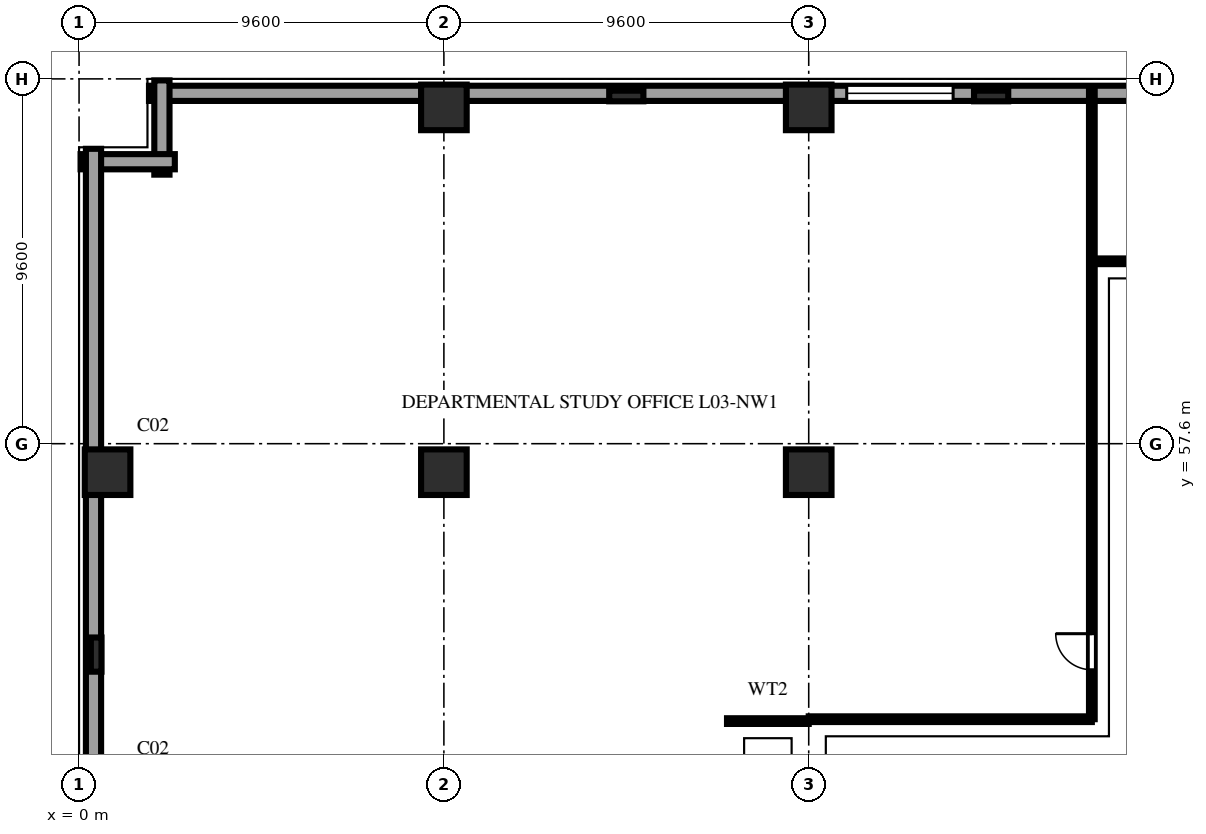
"""IFC4 building model, lengths in metres.
Left out: names, types, materials, properties, quantities, classifications, styles, units other than length and angle.
Written with IfcOpenShell. Run it as: python <this file> out.ifc"""

import sys

from ifc_helpers import new_model, si_unit, direction, frame, frame_2d, origin, origin_2d, place, context, subcontext, project, spatial, rectangle, extrude, element, fill, save


model = new_model("IFC4")
c1 = context("Model", 3, precision=1e-05, world=origin(), true_north=direction((0.0, 1.0)))
c2 = subcontext(c1, "Body", "Model", "MODEL_VIEW")
j1 = project(units=[si_unit("LENGTHUNIT", "METRE"), si_unit("PLANEANGLEUNIT", "RADIAN")], contexts=[c1])
p1 = place(None, origin())
s1 = spatial("IfcSite", under=j1, at=p1, CompositionType="ELEMENT")
p2 = place(p1, origin())
s2 = spatial("IfcBuilding", under=s1, at=p2, CompositionType="ELEMENT")
p3 = place(p2, frame((0.0, 0.0, 15.0)))
s3 = spatial("IfcBuildingStorey", under=s2, at=p3, CompositionType="ELEMENT", Elevation=15.0)
for number, where, z_axis, x_axis in (
    (1, (0.75, 56.85, 0.0), (0.0, 0.0, 1.0), (1.0, 0.0, 0.0)),
    (2, (9.6, 56.85, 0.0), (0.0, 0.0, 1.0), (1.0, 0.0, 0.0)),
    (3, (9.6, 66.45, 0.0), (0.0, 0.0, 1.0), (1.0, 0.0, 0.0)),
    (4, (19.2, 56.85, 0.0), (0.0, 0.0, 1.0), (1.0, 0.0, 0.0)),
    (5, (19.2, 66.45, 0.0), (0.0, 0.0, 1.0), (1.0, 0.0, 0.0)),
):
    element("IfcColumn", number, at=place(p3, frame(where, z_axis=z_axis, x_axis=x_axis)), inside=s3, PredefinedType="COLUMN", context=c2, shape_type="SweptSolid", body=[
        extrude(rectangle(XDim=1.2, YDim=1.2, at=origin_2d()), origin(), (0.0, 0.0, 1.0), 4.6),
    ])
for number, where, z_axis, x_axis in (
    (6, (0.45, 52.05, 0.0), (0.0, 0.0, 1.0), (0.0, 1.0, 0.0)),
    (7, (14.4, 66.75, 0.0), (0.0, 0.0, 1.0), (1.0, 0.0, 0.0)),
    (8, (24.0, 66.75, 0.0), (0.0, 0.0, 1.0), (1.0, 0.0, 0.0)),
):
    element("IfcColumn", number, at=place(p3, frame(where, z_axis=z_axis, x_axis=x_axis)), inside=s3, PredefinedType="PILASTER", context=c2, shape_type="SweptSolid", body=[
        extrude(rectangle(XDim=0.9, YDim=0.28, at=origin_2d()), origin(), (0.0, 0.0, 1.0), 4.6),
    ])
p4 = place(p3, frame((36.56, 66.82, 0.0), z_axis=(0.0, 0.0, 1.0), x_axis=(-1.0, 0.0, 0.0)))
e9 = element("IfcWall", 9, at=p4, inside=s3, PredefinedType="SOLIDWALL", context=c2, shape_type="SweptSolid", body=[
    extrude(rectangle(XDim=34.72, YDim=0.4, at=frame_2d((17.36, 0.0))), origin(), (0.0, 0.0, 1.0), 4.26),
])
p5 = place(p4, frame((13.56, 0.0, 0.75)))
e10 = element("IfcOpeningElement", 10, at=p5, cuts=e9, PredefinedType="OPENING", context=c2, shape_type="SweptSolid", body=[
    extrude(rectangle(XDim=2.8, YDim=2.3, at=frame_2d((1.4, 1.15))), frame((0.0, 0.212, 0.0), z_axis=(0.0, -1.0, 0.0), x_axis=(1.0, 0.0, 0.0)), (0.0, 0.0, 1.0), 0.424),
])
for number, where, z_axis, x_axis in (
    (11, (2.18, 67.16, 0.0), (0.0, 0.0, 1.0), (0.0, -1.0, 0.0)),
    (12, (2.52, 65.02, 0.0), (0.0, 0.0, 1.0), (-1.0, 0.0, 0.0)),
):
    element("IfcWall", number, at=place(p3, frame(where, z_axis=z_axis, x_axis=x_axis)), inside=s3, PredefinedType="SOLIDWALL", context=c2, shape_type="SweptSolid", body=[
        extrude(rectangle(XDim=2.48, YDim=0.4, at=frame_2d((1.24, 0.0))), origin(), (0.0, 0.0, 1.0), 4.26),
    ])
p6 = place(p3, frame((0.38, 65.36, 0.0), z_axis=(0.0, 0.0, 1.0), x_axis=(0.0, -1.0, 0.0)))
e13 = element("IfcWall", 13, at=p6, inside=s3, PredefinedType="SOLIDWALL", context=c2, shape_type="SweptSolid", body=[
    extrude(rectangle(XDim=63.52, YDim=0.4, at=frame_2d((31.76, 0.0))), origin(), (0.0, 0.0, 1.0), 4.26),
])
p7 = place(p6, frame((32.76, 0.0, 0.75)))
e14 = element("IfcOpeningElement", 14, at=p7, cuts=e13, PredefinedType="OPENING", context=c2, shape_type="SweptSolid", body=[
    extrude(rectangle(XDim=2.8, YDim=2.3, at=frame_2d((1.4, 1.15))), frame((0.0, 0.212, 0.0), z_axis=(0.0, -1.0, 0.0), x_axis=(1.0, 0.0, 0.0)), (0.0, 0.0, 1.0), 0.424),
])
p8 = place(p6, frame((37.56, 0.0, 0.75)))
e15 = element("IfcOpeningElement", 15, at=p8, cuts=e13, PredefinedType="OPENING", context=c2, shape_type="SweptSolid", body=[
    extrude(rectangle(XDim=2.8, YDim=2.3, at=frame_2d((1.4, 1.15))), frame((0.0, 0.212, 0.0), z_axis=(0.0, -1.0, 0.0), x_axis=(1.0, 0.0, 0.0)), (0.0, 0.0, 1.0), 0.424),
])
p9 = place(p6, frame((42.36, 0.0, 0.75)))
e16 = element("IfcOpeningElement", 16, at=p9, cuts=e13, PredefinedType="OPENING", context=c2, shape_type="SweptSolid", body=[
    extrude(rectangle(XDim=2.8, YDim=2.3, at=frame_2d((1.4, 1.15))), frame((0.0, 0.212, 0.0), z_axis=(0.0, -1.0, 0.0), x_axis=(1.0, 0.0, 0.0)), (0.0, 0.0, 1.0), 0.424),
])
p10 = place(p6, frame((47.16, 0.0, 0.75)))
e17 = element("IfcOpeningElement", 17, at=p10, cuts=e13, PredefinedType="OPENING", context=c2, shape_type="SweptSolid", body=[
    extrude(rectangle(XDim=2.8, YDim=2.3, at=frame_2d((1.4, 1.15))), frame((0.0, 0.212, 0.0), z_axis=(0.0, -1.0, 0.0), x_axis=(1.0, 0.0, 0.0)), (0.0, 0.0, 1.0), 0.424),
])
p11 = place(p6, frame((51.96, 0.0, 0.75)))
e18 = element("IfcOpeningElement", 18, at=p11, cuts=e13, PredefinedType="OPENING", context=c2, shape_type="SweptSolid", body=[
    extrude(rectangle(XDim=2.8, YDim=2.3, at=frame_2d((1.4, 1.15))), frame((0.0, 0.212, 0.0), z_axis=(0.0, -1.0, 0.0), x_axis=(1.0, 0.0, 0.0)), (0.0, 0.0, 1.0), 0.424),
])
p12 = place(p3, frame((17.05, 50.3, 0.0), z_axis=(0.0, 0.0, 1.0), x_axis=(1.0, 0.0, 0.0)))
e19 = element("IfcWall", 19, at=p12, inside=s3, PredefinedType="PARTITIONING", context=c2, shape_type="SweptSolid", body=[
    extrude(rectangle(XDim=2.15, YDim=0.15, at=frame_2d((1.075, 0.0))), origin(), (0.0, 0.0, 1.0), 4.26),
])
p13 = place(p3, frame((19.2, 50.35, 0.0), z_axis=(0.0, 0.0, 1.0), x_axis=(1.0, 0.0, 0.0)))
e20 = element("IfcWall", 20, at=p13, inside=s3, PredefinedType="PARTITIONING", context=c2, shape_type="SweptSolid", body=[
    extrude(rectangle(XDim=7.45, YDim=0.15, at=frame_2d((3.725, 0.0))), origin(), (0.0, 0.0, 1.0), 4.26),
])
p14 = place(p3, frame((26.65, 62.4, 0.0), z_axis=(0.0, 0.0, 1.0), x_axis=(1.0, 0.0, 0.0)))
e21 = element("IfcWall", 21, at=p14, inside=s3, PredefinedType="PARTITIONING", context=c2, shape_type="SweptSolid", body=[
    extrude(rectangle(XDim=2.15, YDim=0.15, at=frame_2d((1.075, 0.0))), origin(), (0.0, 0.0, 1.0), 4.26),
])
p15 = place(p3, frame((26.65, 50.35, 0.0), z_axis=(0.0, 0.0, 1.0), x_axis=(0.0, 1.0, 0.0)))
e22 = element("IfcWall", 22, at=p15, inside=s3, PredefinedType="PARTITIONING", context=c2, shape_type="SweptSolid", body=[
    extrude(rectangle(XDim=16.63, YDim=0.15, at=frame_2d((8.315, 0.0))), origin(), (0.0, 0.0, 1.0), 4.26),
])
p16 = place(p15, frame((1.3, 0.0, 0.0)))
e23 = element("IfcOpeningElement", 23, at=p16, cuts=e22, PredefinedType="OPENING", context=c2, shape_type="SweptSolid", body=[
    extrude(rectangle(XDim=0.95, YDim=2.15, at=frame_2d((0.475, 1.075))), frame((0.0, 0.087, 0.0), z_axis=(0.0, -1.0, 0.0), x_axis=(1.0, 0.0, 0.0)), (0.0, 0.0, 1.0), 0.174),
])
p17 = place(p5, origin())
e24 = element("IfcWindow", 24, at=p17, inside=s3, PartitioningType="TRIPLE_PANEL_VERTICAL", PredefinedType="WINDOW", context=c2, shape_type="SweptSolid", body=[
    extrude(rectangle(XDim=2.8, YDim=2.3, at=frame_2d((1.4, 1.15))), frame((0.0, 0.11, 0.0), z_axis=(0.0, -1.0, 0.0), x_axis=(1.0, 0.0, 0.0)), (0.0, 0.0, 1.0), 0.06),
])
fill(e10, e24)
p18 = place(p16, origin())
e25 = element("IfcDoor", 25, at=p18, inside=s3, OperationType="SINGLE_SWING_RIGHT", PredefinedType="DOOR", context=c2, shape_type="SweptSolid", body=[
    extrude(rectangle(XDim=0.95, YDim=2.15, at=frame_2d((0.475, 1.075))), frame((0.0, 0.025, 0.0), z_axis=(0.0, -1.0, 0.0), x_axis=(1.0, 0.0, 0.0)), (0.0, 0.0, 1.0), 0.05),
])
fill(e23, e25)
save(model, sys.argv[1])
